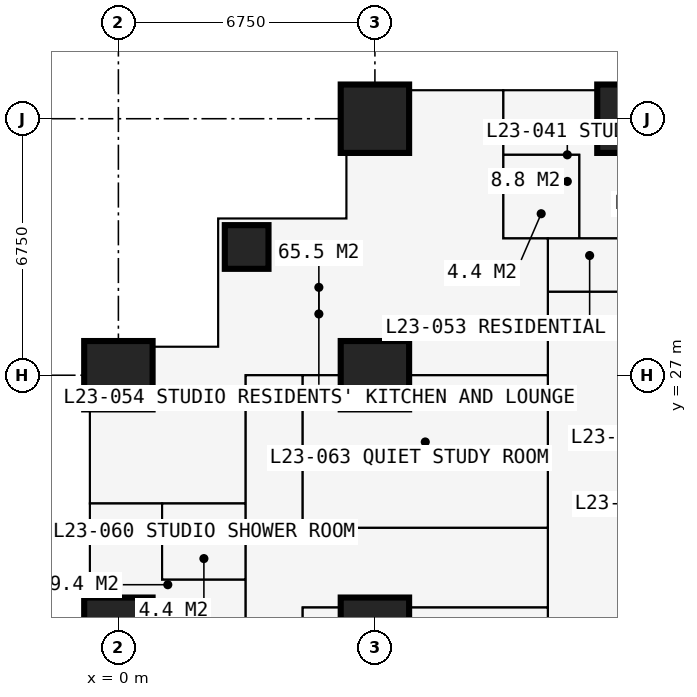
"""IFC4 building model, lengths in metres.
Left out: names, types, materials, properties, quantities, classifications, styles, units other than length and angle.
Written with IfcOpenShell. Run it as: python <this file> out.ifc"""

import sys

from ifc_helpers import new_model, si_unit, direction, frame, frame_2d, origin, origin_2d, place, context, subcontext, project, spatial, rectangle, extrude, element, fill, save


model = new_model("IFC4")
c1 = context("Model", 3, precision=1e-05, world=origin(), true_north=direction((0.0, 1.0)))
c2 = subcontext(c1, "Body", "Model", "MODEL_VIEW")
j1 = project(units=[si_unit("LENGTHUNIT", "METRE"), si_unit("PLANEANGLEUNIT", "RADIAN")], contexts=[c1])
p1 = place(None, origin())
s1 = spatial("IfcSite", under=j1, at=p1, CompositionType="ELEMENT")
p2 = place(p1, origin())
s2 = spatial("IfcBuilding", under=s1, at=p2, CompositionType="ELEMENT")
p3 = place(p2, frame((0.0, 0.0, 87.3)))
s3 = spatial("IfcBuildingStorey", under=s2, at=p3, CompositionType="ELEMENT", Elevation=87.3)
for number, where, z_axis, x_axis in (
    (1, (0.0, 20.25, 0.0), (0.0, 0.0, 1.0), (1.0, 0.0, 0.0)),
    (2, (0.0, 27.0, 0.0), (0.0, 0.0, 1.0), (1.0, 0.0, 0.0)),
):
    element("IfcColumn", number, at=place(p3, frame(where, z_axis=z_axis, x_axis=x_axis)), inside=s3, PredefinedType="COLUMN", context=c2, shape_type="SweptSolid", body=[
        extrude(rectangle(XDim=1.8, YDim=1.8, at=origin_2d()), origin(), (0.0, 0.0, 1.0), 3.6),
    ])
p4 = place(p3, frame((3.375, 30.375, 0.0), z_axis=(0.0, 0.0, 1.0), x_axis=(1.0, 0.0, 0.0)))
e3 = element("IfcColumn", 3, at=p4, inside=s3, PredefinedType="COLUMN", context=c2, shape_type="SweptSolid", body=[
    extrude(rectangle(XDim=1.15, YDim=1.15, at=origin_2d()), origin(), (0.0, 0.0, 1.0), 3.6),
])
for number, where, z_axis, x_axis in (
    (4, (6.75, 20.25, 0.0), (0.0, 0.0, 1.0), (1.0, 0.0, 0.0)),
    (5, (6.75, 27.0, 0.0), (0.0, 0.0, 1.0), (1.0, 0.0, 0.0)),
    (6, (6.75, 33.75, 0.0), (0.0, 0.0, 1.0), (1.0, 0.0, 0.0)),
    (7, (13.5, 33.75, 0.0), (0.0, 0.0, 1.0), (1.0, 0.0, 0.0)),
):
    element("IfcColumn", number, at=place(p3, frame(where, z_axis=z_axis, x_axis=x_axis)), inside=s3, PredefinedType="COLUMN", context=c2, shape_type="SweptSolid", body=[
        extrude(rectangle(XDim=1.8, YDim=1.8, at=origin_2d()), origin(), (0.0, 0.0, 1.0), 3.6),
    ])
p5 = place(p3, frame((27.6, 27.0, 0.0), z_axis=(0.0, 0.0, 1.0), x_axis=(-1.0, 0.0, 0.0)))
e8 = element("IfcWall", 8, at=p5, inside=s3, PredefinedType="SHEAR", context=c2, shape_type="SweptSolid", body=[
    extrude(rectangle(XDim=14.7, YDim=1.2, at=frame_2d((7.35, 0.0))), origin(), (0.0, 0.0, 1.0), 3.6),
])
p6 = place(p5, frame((5.225, 0.0, 0.0)))
e9 = element("IfcOpeningElement", 9, at=p6, cuts=e8, PredefinedType="OPENING", context=c2, shape_type="SweptSolid", body=[
    extrude(rectangle(XDim=0.9, YDim=2.2, at=frame_2d((0.45, 1.1))), frame((0.0, 0.61, 0.0), z_axis=(0.0, -1.0, 0.0), x_axis=(1.0, 0.0, 0.0)), (0.0, 0.0, 1.0), 1.22),
])
p7 = place(p5, frame((8.2, 0.0, 0.0)))
e10 = element("IfcOpeningElement", 10, at=p7, cuts=e8, PredefinedType="OPENING", context=c2, shape_type="SweptSolid", body=[
    extrude(rectangle(XDim=1.0, YDim=2.2, at=frame_2d((0.5, 1.1))), frame((0.0, 0.61, 0.0), z_axis=(0.0, -1.0, 0.0), x_axis=(1.0, 0.0, 0.0)), (0.0, 0.0, 1.0), 1.22),
])
p8 = place(p3, frame((13.5, 26.4, 0.0), z_axis=(0.0, 0.0, 1.0), x_axis=(0.0, -1.0, 0.0)))
e11 = element("IfcWall", 11, at=p8, inside=s3, PredefinedType="SHEAR", context=c2, shape_type="SweptSolid", body=[
    extrude(rectangle(XDim=12.3, YDim=1.2, at=frame_2d((6.15, 0.0))), origin(), (0.0, 0.0, 1.0), 3.6),
])
p9 = place(p8, frame((7.45, 0.0, 0.0)))
e12 = element("IfcOpeningElement", 12, at=p9, cuts=e11, PredefinedType="OPENING", context=c2, shape_type="SweptSolid", body=[
    extrude(rectangle(XDim=1.2, YDim=2.2, at=frame_2d((0.6, 1.1))), frame((0.0, 0.61, 0.0), z_axis=(0.0, -1.0, 0.0), x_axis=(1.0, 0.0, 0.0)), (0.0, 0.0, 1.0), 1.22),
])
p10 = place(p3, frame((6.0, 34.5, 0.0), z_axis=(0.0, 0.0, 1.0), x_axis=(0.0, -1.0, 0.0)))
e13 = element("IfcWall", 13, at=p10, inside=s3, PredefinedType="SOLIDWALL", context=c2, shape_type="SweptSolid", body=[
    extrude(rectangle(XDim=3.375, YDim=0.3, at=frame_2d((1.688, 0.0))), origin(), (0.0, 0.0, 1.0), 3.375),
])
p11 = place(p10, frame((1.833, 0.0, 0.9)))
e14 = element("IfcOpeningElement", 14, at=p11, cuts=e13, PredefinedType="OPENING", context=c2, shape_type="SweptSolid", body=[
    extrude(rectangle(XDim=1.2, YDim=1.8, at=frame_2d((0.6, 0.9))), frame((0.0, 0.16, 0.0), z_axis=(0.0, -1.0, 0.0), x_axis=(1.0, 0.0, 0.0)), (0.0, 0.0, 1.0), 0.32),
])
p12 = place(p3, frame((6.0, 31.125, 0.0), z_axis=(0.0, 0.0, 1.0), x_axis=(-1.0, 0.0, 0.0)))
e15 = element("IfcWall", 15, at=p12, inside=s3, PredefinedType="SOLIDWALL", context=c2, shape_type="SweptSolid", body=[
    extrude(rectangle(XDim=3.375, YDim=0.3, at=frame_2d((1.688, 0.0))), origin(), (0.0, 0.0, 1.0), 3.375),
])
p13 = place(p12, frame((0.788, 0.0, 0.6)))
e16 = element("IfcOpeningElement", 16, at=p13, cuts=e15, PredefinedType="OPENING", context=c2, shape_type="SweptSolid", body=[
    extrude(rectangle(XDim=1.8, YDim=2.1, at=frame_2d((0.9, 1.05))), frame((0.0, 0.16, 0.0), z_axis=(0.0, -1.0, 0.0), x_axis=(1.0, 0.0, 0.0)), (0.0, 0.0, 1.0), 0.32),
])
p14 = place(p3, frame((2.625, 31.125, 0.0), z_axis=(0.0, 0.0, 1.0), x_axis=(0.0, -1.0, 0.0)))
e17 = element("IfcWall", 17, at=p14, inside=s3, PredefinedType="SOLIDWALL", context=c2, shape_type="SweptSolid", body=[
    extrude(rectangle(XDim=3.375, YDim=0.3, at=frame_2d((1.688, 0.0))), origin(), (0.0, 0.0, 1.0), 3.375),
])
p15 = place(p14, frame((0.788, 0.0, 0.6)))
e18 = element("IfcOpeningElement", 18, at=p15, cuts=e17, PredefinedType="OPENING", context=c2, shape_type="SweptSolid", body=[
    extrude(rectangle(XDim=1.8, YDim=2.1, at=frame_2d((0.9, 1.05))), frame((0.0, 0.16, 0.0), z_axis=(0.0, -1.0, 0.0), x_axis=(1.0, 0.0, 0.0)), (0.0, 0.0, 1.0), 0.32),
])
p16 = place(p3, frame((2.625, 27.75, 0.0), z_axis=(0.0, 0.0, 1.0), x_axis=(-1.0, 0.0, 0.0)))
e19 = element("IfcWall", 19, at=p16, inside=s3, PredefinedType="SOLIDWALL", context=c2, shape_type="SweptSolid", body=[
    extrude(rectangle(XDim=3.375, YDim=0.3, at=frame_2d((1.688, 0.0))), origin(), (0.0, 0.0, 1.0), 3.375),
])
p17 = place(p16, frame((0.343, 0.0, 0.9)))
e20 = element("IfcOpeningElement", 20, at=p17, cuts=e19, PredefinedType="OPENING", context=c2, shape_type="SweptSolid", body=[
    extrude(rectangle(XDim=1.2, YDim=1.8, at=frame_2d((0.6, 0.9))), frame((0.0, 0.16, 0.0), z_axis=(0.0, -1.0, 0.0), x_axis=(1.0, 0.0, 0.0)), (0.0, 0.0, 1.0), 0.32),
])
p18 = place(p3, frame((-0.734, 23.625, 0.0), z_axis=(0.0, 0.0, 1.0), x_axis=(1.0, 0.0, 0.0)))
e21 = element("IfcWall", 21, at=p18, inside=s3, PredefinedType="PARTITIONING", context=c2, shape_type="SweptSolid", body=[
    extrude(rectangle(XDim=4.084, YDim=0.1, at=frame_2d((2.042, 0.0))), origin(), (0.0, 0.0, 1.0), 3.375),
])
p19 = place(p3, frame((1.15, 21.625, 0.0), z_axis=(0.0, 0.0, 1.0), x_axis=(0.0, 1.0, 0.0)))
e22 = element("IfcWall", 22, at=p19, inside=s3, PredefinedType="PARTITIONING", context=c2, shape_type="SweptSolid", body=[
    extrude(rectangle(XDim=2.0, YDim=0.1, at=frame_2d((1.0, 0.0))), origin(), (0.0, 0.0, 1.0), 3.375),
])
p20 = place(p3, frame((1.15, 21.625, 0.0), z_axis=(0.0, 0.0, 1.0), x_axis=(1.0, 0.0, 0.0)))
e23 = element("IfcWall", 23, at=p20, inside=s3, PredefinedType="PARTITIONING", context=c2, shape_type="SweptSolid", body=[
    extrude(rectangle(XDim=2.2, YDim=0.1, at=frame_2d((1.1, 0.0))), origin(), (0.0, 0.0, 1.0), 3.375),
])
p21 = place(p20, frame((0.65, 0.0, 0.0)))
e24 = element("IfcOpeningElement", 24, at=p21, cuts=e23, PredefinedType="OPENING", context=c2, shape_type="SweptSolid", body=[
    extrude(rectangle(XDim=0.9, YDim=2.2, at=frame_2d((0.45, 1.1))), frame((0.0, 0.06, 0.0), z_axis=(0.0, -1.0, 0.0), x_axis=(1.0, 0.0, 0.0)), (0.0, 0.0, 1.0), 0.12),
])
p22 = place(p3, frame((3.35, 10.125, 0.0), z_axis=(0.0, 0.0, 1.0), x_axis=(0.0, 1.0, 0.0)))
e25 = element("IfcWall", 25, at=p22, inside=s3, PredefinedType="PARTITIONING", context=c2, shape_type="SweptSolid", body=[
    extrude(rectangle(XDim=16.875, YDim=0.15, at=frame_2d((8.438, 0.0))), origin(), (0.0, 0.0, 1.0), 3.375),
])
p23 = place(p22, frame((7.575, 0.0, 0.0)))
e26 = element("IfcOpeningElement", 26, at=p23, cuts=e25, PredefinedType="OPENING", context=c2, shape_type="SweptSolid", body=[
    extrude(rectangle(XDim=0.95, YDim=2.2, at=frame_2d((0.475, 1.1))), frame((0.0, 0.085, 0.0), z_axis=(0.0, -1.0, 0.0), x_axis=(1.0, 0.0, 0.0)), (0.0, 0.0, 1.0), 0.17),
])
p24 = place(p22, frame((0.2, 0.0, 0.0)))
e27 = element("IfcOpeningElement", 27, at=p24, cuts=e25, PredefinedType="OPENING", context=c2, shape_type="SweptSolid", body=[
    extrude(rectangle(XDim=0.95, YDim=2.2, at=frame_2d((0.475, 1.1))), frame((0.0, 0.085, 0.0), z_axis=(0.0, -1.0, 0.0), x_axis=(1.0, 0.0, 0.0)), (0.0, 0.0, 1.0), 0.17),
])
p25 = place(p22, frame((10.375, 0.0, 0.0)))
e28 = element("IfcOpeningElement", 28, at=p25, cuts=e25, PredefinedType="OPENING", context=c2, shape_type="SweptSolid", body=[
    extrude(rectangle(XDim=0.95, YDim=2.2, at=frame_2d((0.475, 1.1))), frame((0.0, 0.085, 0.0), z_axis=(0.0, -1.0, 0.0), x_axis=(1.0, 0.0, 0.0)), (0.0, 0.0, 1.0), 0.17),
])
p26 = place(p3, frame((3.35, 27.0, 0.0), z_axis=(0.0, 0.0, 1.0), x_axis=(1.0, 0.0, 0.0)))
e29 = element("IfcWall", 29, at=p26, inside=s3, PredefinedType="PARTITIONING", context=c2, shape_type="SweptSolid", body=[
    extrude(rectangle(XDim=7.95, YDim=0.15, at=frame_2d((3.975, 0.0))), origin(), (0.0, 0.0, 1.0), 2.806),
])
p27 = place(p3, frame((4.85, 12.775, 0.0), z_axis=(0.0, 0.0, 1.0), x_axis=(0.0, 1.0, 0.0)))
e30 = element("IfcWall", 30, at=p27, inside=s3, PredefinedType="PARTITIONING", context=c2, shape_type="SweptSolid", body=[
    extrude(rectangle(XDim=8.113, YDim=0.15, at=frame_2d((4.056, 0.0))), origin(), (0.0, 0.0, 1.0), 3.375),
])
p28 = place(p27, frame((3.6, 0.0, 0.0)))
e31 = element("IfcOpeningElement", 31, at=p28, cuts=e30, PredefinedType="OPENING", context=c2, shape_type="SweptSolid", body=[
    extrude(rectangle(XDim=0.95, YDim=2.2, at=frame_2d((0.475, 1.1))), frame((0.0, 0.085, 0.0), z_axis=(0.0, -1.0, 0.0), x_axis=(1.0, 0.0, 0.0)), (0.0, 0.0, 1.0), 0.17),
])
p29 = place(p3, frame((4.85, 20.887, 0.0), z_axis=(0.0, 0.0, 1.0), x_axis=(1.0, 0.0, 0.0)))
e32 = element("IfcWall", 32, at=p29, inside=s3, PredefinedType="PARTITIONING", context=c2, shape_type="SweptSolid", body=[
    extrude(rectangle(XDim=6.45, YDim=0.15, at=frame_2d((3.225, 0.0))), origin(), (0.0, 0.0, 1.0), 3.375),
])
p30 = place(p3, frame((4.85, 22.988, 0.0), z_axis=(0.0, 0.0, 1.0), x_axis=(0.0, 1.0, 0.0)))
e33 = element("IfcWall", 33, at=p30, inside=s3, PredefinedType="PARTITIONING", context=c2, shape_type="SweptSolid", body=[
    extrude(rectangle(XDim=4.012, YDim=0.15, at=frame_2d((2.006, 0.0))), origin(), (0.0, 0.0, 1.0), 3.375),
])
p31 = place(p3, frame((4.85, 22.988, 0.0), z_axis=(0.0, 0.0, 1.0), x_axis=(1.0, 0.0, 0.0)))
e34 = element("IfcWall", 34, at=p31, inside=s3, PredefinedType="PARTITIONING", context=c2, shape_type="SweptSolid", body=[
    extrude(rectangle(XDim=6.45, YDim=0.15, at=frame_2d((3.225, 0.0))), origin(), (0.0, 0.0, 1.0), 3.375),
])
p32 = place(p31, frame((2.75, 0.0, 0.0)))
e35 = element("IfcOpeningElement", 35, at=p32, cuts=e34, PredefinedType="OPENING", context=c2, shape_type="SweptSolid", body=[
    extrude(rectangle(XDim=0.95, YDim=2.2, at=frame_2d((0.475, 1.1))), frame((0.0, 0.085, 0.0), z_axis=(0.0, -1.0, 0.0), x_axis=(1.0, 0.0, 0.0)), (0.0, 0.0, 1.0), 0.17),
])
p33 = place(p3, frame((10.125, 30.6, 0.0), z_axis=(0.0, 0.0, 1.0), x_axis=(0.0, 1.0, 0.0)))
e36 = element("IfcWall", 36, at=p33, inside=s3, PredefinedType="PARTITIONING", context=c2, shape_type="SweptSolid", body=[
    extrude(rectangle(XDim=3.884, YDim=0.1, at=frame_2d((1.942, 0.0))), origin(), (0.0, 0.0, 1.0), 3.375),
])
p34 = place(p3, frame((10.125, 30.6, 0.0), z_axis=(0.0, 0.0, 1.0), x_axis=(1.0, 0.0, 0.0)))
e37 = element("IfcWall", 37, at=p34, inside=s3, PredefinedType="PARTITIONING", context=c2, shape_type="SweptSolid", body=[
    extrude(rectangle(XDim=3.375, YDim=0.1, at=frame_2d((1.688, 0.0))), origin(), (0.0, 0.0, 1.0), 3.375),
])
p35 = place(p34, frame((2.2, 0.0, 0.0)))
e38 = element("IfcOpeningElement", 38, at=p35, cuts=e37, PredefinedType="OPENING", context=c2, shape_type="SweptSolid", body=[
    extrude(rectangle(XDim=0.95, YDim=2.2, at=frame_2d((0.475, 1.1))), frame((0.0, 0.06, 0.0), z_axis=(0.0, -1.0, 0.0), x_axis=(1.0, 0.0, 0.0)), (0.0, 0.0, 1.0), 0.12),
])
p36 = place(p3, frame((10.125, 32.8, 0.0), z_axis=(0.0, 0.0, 1.0), x_axis=(1.0, 0.0, 0.0)))
e39 = element("IfcWall", 39, at=p36, inside=s3, PredefinedType="PARTITIONING", context=c2, shape_type="SweptSolid", body=[
    extrude(rectangle(XDim=2.0, YDim=0.1, at=frame_2d((1.0, 0.0))), origin(), (0.0, 0.0, 1.0), 3.375),
])
p37 = place(p3, frame((11.3, 11.3, 0.0), z_axis=(0.0, 0.0, 1.0), x_axis=(0.0, 1.0, 0.0)))
e40 = element("IfcWall", 40, at=p37, inside=s3, PredefinedType="PARTITIONING", context=c2, shape_type="SweptSolid", body=[
    extrude(rectangle(XDim=19.3, YDim=0.15, at=frame_2d((9.65, 0.0))), origin(), (0.0, 0.0, 1.0), 3.375),
])
p38 = place(p37, frame((18.1, 0.0, 0.0)))
e41 = element("IfcOpeningElement", 41, at=p38, cuts=e40, PredefinedType="OPENING", context=c2, shape_type="SweptSolid", body=[
    extrude(rectangle(XDim=1.0, YDim=2.2, at=frame_2d((0.5, 1.1))), frame((0.0, 0.085, 0.0), z_axis=(0.0, -1.0, 0.0), x_axis=(1.0, 0.0, 0.0)), (0.0, 0.0, 1.0), 0.17),
])
p39 = place(p37, frame((10.137, 0.0, 0.0)))
e42 = element("IfcOpeningElement", 42, at=p39, cuts=e40, PredefinedType="OPENING", context=c2, shape_type="SweptSolid", body=[
    extrude(rectangle(XDim=1.0, YDim=2.2, at=frame_2d((0.5, 1.1))), frame((0.0, 0.085, 0.0), z_axis=(0.0, -1.0, 0.0), x_axis=(1.0, 0.0, 0.0)), (0.0, 0.0, 1.0), 0.17),
])
p40 = place(p3, frame((11.3, 29.2, 0.0), z_axis=(0.0, 0.0, 1.0), x_axis=(1.0, 0.0, 0.0)))
e43 = element("IfcWall", 43, at=p40, inside=s3, PredefinedType="PARTITIONING", context=c2, shape_type="SweptSolid", body=[
    extrude(rectangle(XDim=19.075, YDim=0.15, at=frame_2d((9.538, 0.0))), origin(), (0.0, 0.0, 1.0), 3.375),
])
p41 = place(p40, frame((5.825, 0.0, 0.0)))
e44 = element("IfcOpeningElement", 44, at=p41, cuts=e43, PredefinedType="OPENING", context=c2, shape_type="SweptSolid", body=[
    extrude(rectangle(XDim=0.95, YDim=2.2, at=frame_2d((0.475, 1.1))), frame((0.0, 0.085, 0.0), z_axis=(0.0, -1.0, 0.0), x_axis=(1.0, 0.0, 0.0)), (0.0, 0.0, 1.0), 0.17),
])
p42 = place(p40, frame((9.2, 0.0, 0.0)))
e45 = element("IfcOpeningElement", 45, at=p42, cuts=e43, PredefinedType="OPENING", context=c2, shape_type="SweptSolid", body=[
    extrude(rectangle(XDim=0.95, YDim=2.2, at=frame_2d((0.475, 1.1))), frame((0.0, 0.085, 0.0), z_axis=(0.0, -1.0, 0.0), x_axis=(1.0, 0.0, 0.0)), (0.0, 0.0, 1.0), 0.17),
])
p43 = place(p40, frame((12.575, 0.0, 0.0)))
e46 = element("IfcOpeningElement", 46, at=p43, cuts=e43, PredefinedType="OPENING", context=c2, shape_type="SweptSolid", body=[
    extrude(rectangle(XDim=0.95, YDim=2.2, at=frame_2d((0.475, 1.1))), frame((0.0, 0.085, 0.0), z_axis=(0.0, -1.0, 0.0), x_axis=(1.0, 0.0, 0.0)), (0.0, 0.0, 1.0), 0.17),
])
p44 = place(p40, frame((15.95, 0.0, 0.0)))
e47 = element("IfcOpeningElement", 47, at=p44, cuts=e43, PredefinedType="OPENING", context=c2, shape_type="SweptSolid", body=[
    extrude(rectangle(XDim=0.95, YDim=2.2, at=frame_2d((0.475, 1.1))), frame((0.0, 0.085, 0.0), z_axis=(0.0, -1.0, 0.0), x_axis=(1.0, 0.0, 0.0)), (0.0, 0.0, 1.0), 0.17),
])
p45 = place(p40, frame((0.6, 0.0, 0.0)))
e48 = element("IfcOpeningElement", 48, at=p45, cuts=e43, PredefinedType="OPENING", context=c2, shape_type="SweptSolid", body=[
    extrude(rectangle(XDim=1.0, YDim=2.2, at=frame_2d((0.5, 1.1))), frame((0.0, 0.085, 0.0), z_axis=(0.0, -1.0, 0.0), x_axis=(1.0, 0.0, 0.0)), (0.0, 0.0, 1.0), 0.17),
])
p46 = place(p3, frame((12.125, 30.6, 0.0), z_axis=(0.0, 0.0, 1.0), x_axis=(0.0, 1.0, 0.0)))
e49 = element("IfcWall", 49, at=p46, inside=s3, PredefinedType="PARTITIONING", context=c2, shape_type="SweptSolid", body=[
    extrude(rectangle(XDim=2.2, YDim=0.1, at=frame_2d((1.1, 0.0))), origin(), (0.0, 0.0, 1.0), 3.375),
])
p47 = place(p46, frame((0.65, 0.0, 0.0)))
e50 = element("IfcOpeningElement", 50, at=p47, cuts=e49, PredefinedType="OPENING", context=c2, shape_type="SweptSolid", body=[
    extrude(rectangle(XDim=0.9, YDim=2.2, at=frame_2d((0.45, 1.1))), frame((0.0, 0.06, 0.0), z_axis=(0.0, -1.0, 0.0), x_axis=(1.0, 0.0, 0.0)), (0.0, 0.0, 1.0), 0.12),
])
p48 = place(p11, origin())
e51 = element("IfcWindow", 51, at=p48, inside=s3, PartitioningType="SINGLE_PANEL", PredefinedType="WINDOW", context=c2, shape_type="SweptSolid", body=[
    extrude(rectangle(XDim=1.2, YDim=1.8, at=frame_2d((0.6, 0.9))), frame((0.0, 0.03, 0.0), z_axis=(0.0, -1.0, 0.0), x_axis=(1.0, 0.0, 0.0)), (0.0, 0.0, 1.0), 0.06),
])
fill(e14, e51)
p49 = place(p13, origin())
e52 = element("IfcWindow", 52, at=p49, inside=s3, PartitioningType="SINGLE_PANEL", PredefinedType="WINDOW", context=c2, shape_type="SweptSolid", body=[
    extrude(rectangle(XDim=1.8, YDim=2.1, at=frame_2d((0.9, 1.05))), frame((0.0, 0.03, 0.0), z_axis=(0.0, -1.0, 0.0), x_axis=(1.0, 0.0, 0.0)), (0.0, 0.0, 1.0), 0.06),
])
fill(e16, e52)
p50 = place(p15, origin())
e53 = element("IfcWindow", 53, at=p50, inside=s3, PartitioningType="SINGLE_PANEL", PredefinedType="WINDOW", context=c2, shape_type="SweptSolid", body=[
    extrude(rectangle(XDim=1.8, YDim=2.1, at=frame_2d((0.9, 1.05))), frame((0.0, 0.03, 0.0), z_axis=(0.0, -1.0, 0.0), x_axis=(1.0, 0.0, 0.0)), (0.0, 0.0, 1.0), 0.06),
])
fill(e18, e53)
p51 = place(p17, origin())
e54 = element("IfcWindow", 54, at=p51, inside=s3, PartitioningType="SINGLE_PANEL", PredefinedType="WINDOW", context=c2, shape_type="SweptSolid", body=[
    extrude(rectangle(XDim=1.2, YDim=1.8, at=frame_2d((0.6, 0.9))), frame((0.0, 0.03, 0.0), z_axis=(0.0, -1.0, 0.0), x_axis=(1.0, 0.0, 0.0)), (0.0, 0.0, 1.0), 0.06),
])
fill(e20, e54)
p52 = place(p35, origin())
e55 = element("IfcDoor", 55, at=p52, inside=s3, OperationType="SINGLE_SWING_LEFT", PredefinedType="DOOR", context=c2, shape_type="SweptSolid", body=[
    extrude(rectangle(XDim=0.95, YDim=2.2, at=frame_2d((0.475, 1.1))), frame((0.0, 0.025, 0.0), z_axis=(0.0, -1.0, 0.0), x_axis=(1.0, 0.0, 0.0)), (0.0, 0.0, 1.0), 0.05),
])
fill(e38, e55)
p53 = place(p47, origin())
e56 = element("IfcDoor", 56, at=p53, inside=s3, OperationType="SINGLE_SWING_RIGHT", PredefinedType="DOOR", context=c2, shape_type="SweptSolid", body=[
    extrude(rectangle(XDim=0.9, YDim=2.2, at=frame_2d((0.45, 1.1))), frame((0.0, 0.025, 0.0), z_axis=(0.0, -1.0, 0.0), x_axis=(1.0, 0.0, 0.0)), (0.0, 0.0, 1.0), 0.05),
])
fill(e50, e56)
p54 = place(p45, origin())
e57 = element("IfcDoor", 57, at=p54, inside=s3, OperationType="SINGLE_SWING_LEFT", PredefinedType="DOOR", context=c2, shape_type="SweptSolid", body=[
    extrude(rectangle(XDim=1.0, YDim=2.2, at=frame_2d((0.5, 1.1))), frame((0.0, 0.025, 0.0), z_axis=(0.0, -1.0, 0.0), x_axis=(1.0, 0.0, 0.0)), (0.0, 0.0, 1.0), 0.05),
])
fill(e48, e57)
p55 = place(p38, origin())
e58 = element("IfcDoor", 58, at=p55, inside=s3, OperationType="SINGLE_SWING_LEFT", PredefinedType="DOOR", context=c2, shape_type="SweptSolid", body=[
    extrude(rectangle(XDim=1.0, YDim=2.2, at=frame_2d((0.5, 1.1))), frame((0.0, 0.025, 0.0), z_axis=(0.0, -1.0, 0.0), x_axis=(1.0, 0.0, 0.0)), (0.0, 0.0, 1.0), 0.05),
])
fill(e41, e58)
p56 = place(p25, origin())
e59 = element("IfcDoor", 59, at=p56, inside=s3, OperationType="SINGLE_SWING_LEFT", PredefinedType="DOOR", context=c2, shape_type="SweptSolid", body=[
    extrude(rectangle(XDim=0.95, YDim=2.2, at=frame_2d((0.475, 1.1))), frame((0.0, 0.025, 0.0), z_axis=(0.0, -1.0, 0.0), x_axis=(1.0, 0.0, 0.0)), (0.0, 0.0, 1.0), 0.05),
])
fill(e28, e59)
p57 = place(p21, origin())
e60 = element("IfcDoor", 60, at=p57, inside=s3, OperationType="SINGLE_SWING_RIGHT", PredefinedType="DOOR", context=c2, shape_type="SweptSolid", body=[
    extrude(rectangle(XDim=0.9, YDim=2.2, at=frame_2d((0.45, 1.1))), frame((0.0, 0.025, 0.0), z_axis=(0.0, -1.0, 0.0), x_axis=(1.0, 0.0, 0.0)), (0.0, 0.0, 1.0), 0.05),
])
fill(e24, e60)
p58 = place(p39, origin())
e61 = element("IfcDoor", 61, at=p58, inside=s3, OperationType="SINGLE_SWING_LEFT", PredefinedType="DOOR", context=c2, shape_type="SweptSolid", body=[
    extrude(rectangle(XDim=1.0, YDim=2.2, at=frame_2d((0.5, 1.1))), frame((0.0, 0.025, 0.0), z_axis=(0.0, -1.0, 0.0), x_axis=(1.0, 0.0, 0.0)), (0.0, 0.0, 1.0), 0.05),
])
fill(e42, e61)
p59 = place(p32, origin())
e62 = element("IfcDoor", 62, at=p59, inside=s3, OperationType="SINGLE_SWING_LEFT", PredefinedType="DOOR", context=c2, shape_type="SweptSolid", body=[
    extrude(rectangle(XDim=0.95, YDim=2.2, at=frame_2d((0.475, 1.1))), frame((0.0, 0.025, 0.0), z_axis=(0.0, -1.0, 0.0), x_axis=(1.0, 0.0, 0.0)), (0.0, 0.0, 1.0), 0.05),
])
fill(e35, e62)
save(model, sys.argv[1])
